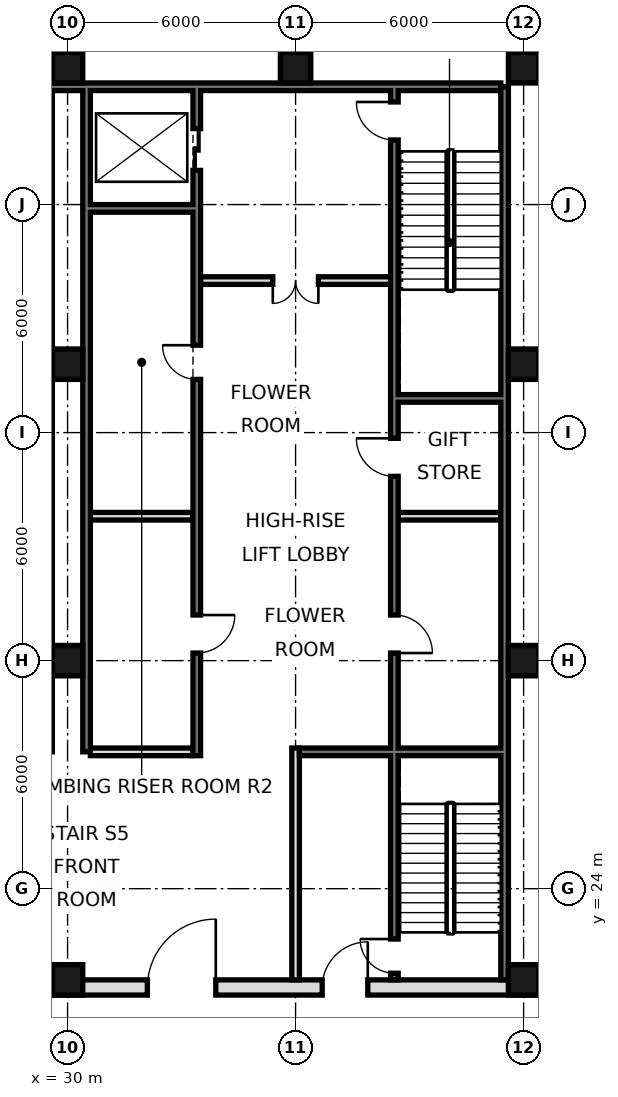
"""IFC4 building model, lengths in metres.
Left out: names, types, materials, properties, quantities, classifications, styles, units other than length and angle.
Written with IfcOpenShell. Run it as: python <this file> out.ifc"""

import sys

from ifc_helpers import new_model, si_unit, direction, frame, frame_2d, origin, origin_2d, place, context, subcontext, project, spatial, rectangle, hollow_rectangle, extrude, element, fill, save


model = new_model("IFC4")
c1 = context("Model", 3, precision=1e-05, world=origin(), true_north=direction((0.0, 1.0)))
c2 = subcontext(c1, "Body", "Model", "MODEL_VIEW")
j1 = project(units=[si_unit("LENGTHUNIT", "METRE"), si_unit("PLANEANGLEUNIT", "RADIAN")], contexts=[c1])
p1 = place(None, origin())
s1 = spatial("IfcSite", under=j1, at=p1, CompositionType="ELEMENT")
p2 = place(p1, origin())
s2 = spatial("IfcBuilding", under=s1, at=p2, CompositionType="ELEMENT")
p3 = place(p2, frame((0.0, 0.0, 39.6)))
s3 = spatial("IfcBuildingStorey", under=s2, at=p3, CompositionType="ELEMENT", Elevation=39.6)
for number, where, z_axis, x_axis in (
    (1, (30.0, 21.6, 0.0), (0.0, 0.0, 1.0), (1.0, 0.0, 0.0)),
    (2, (30.0, 30.0, 0.0), (0.0, 0.0, 1.0), (1.0, 0.0, 0.0)),
    (3, (30.0, 37.8, 0.0), (0.0, 0.0, 1.0), (1.0, 0.0, 0.0)),
    (4, (30.0, 45.6, 0.0), (0.0, 0.0, 1.0), (1.0, 0.0, 0.0)),
    (5, (36.0, 45.6, 0.0), (0.0, 0.0, 1.0), (1.0, 0.0, 0.0)),
    (6, (42.0, 21.6, 0.0), (0.0, 0.0, 1.0), (1.0, 0.0, 0.0)),
    (7, (42.0, 30.0, 0.0), (0.0, 0.0, 1.0), (1.0, 0.0, 0.0)),
    (8, (42.0, 37.8, 0.0), (0.0, 0.0, 1.0), (1.0, 0.0, 0.0)),
    (9, (42.0, 45.6, 0.0), (0.0, 0.0, 1.0), (1.0, 0.0, 0.0)),
):
    element("IfcColumn", number, at=place(p3, frame(where, z_axis=z_axis, x_axis=x_axis)), inside=s3, PredefinedType="COLUMN", context=c2, shape_type="SweptSolid", body=[
        extrude(hollow_rectangle(XDim=0.8, YDim=0.8, WallThickness=0.07, at=origin_2d()), origin(), (0.0, 0.0, 1.0), 4.8),
    ])
p4 = place(p3, frame((41.5, 21.6, 0.0), z_axis=(0.0, 0.0, 1.0), x_axis=(0.0, 1.0, 0.0)))
e10 = element("IfcWall", 10, at=p4, inside=s3, PredefinedType="SOLIDWALL", context=c2, shape_type="SweptSolid", body=[
    extrude(rectangle(XDim=23.5, YDim=0.2, at=frame_2d((11.75, 0.0))), origin(), (0.0, 0.0, 1.0), 4.5),
])
p5 = place(p3, frame((6.6, 45.1, 0.0), z_axis=(0.0, 0.0, 1.0), x_axis=(1.0, 0.0, 0.0)))
e11 = element("IfcWall", 11, at=p5, inside=s3, PredefinedType="SOLIDWALL", context=c2, shape_type="SweptSolid", body=[
    extrude(rectangle(XDim=34.8, YDim=0.2, at=frame_2d((17.4, 0.0))), origin(), (0.0, 0.0, 1.0), 4.5),
])
p6 = place(p3, frame((30.5, 27.6, 0.0), z_axis=(0.0, 0.0, 1.0), x_axis=(0.0, 1.0, 0.0)))
e12 = element("IfcWall", 12, at=p6, inside=s3, PredefinedType="SOLIDWALL", context=c2, shape_type="SweptSolid", body=[
    extrude(rectangle(XDim=17.5, YDim=0.2, at=frame_2d((8.75, 0.0))), origin(), (0.0, 0.0, 1.0), 4.5),
])
p7 = place(p3, frame((5.6, 21.4, 0.0), z_axis=(0.0, 0.0, 1.0), x_axis=(1.0, 0.0, 0.0)))
e13 = element("IfcWall", 13, at=p7, inside=s3, PredefinedType="SOLIDWALL", context=c2, shape_type="SweptSolid", body=[
    extrude(rectangle(XDim=36.8, YDim=0.4, at=frame_2d((18.4, 0.0))), origin(), (0.0, 0.0, 1.0), 4.5),
])
p8 = place(p7, frame((8.5, 0.0, 0.0)))
e14 = element("IfcOpeningElement", 14, at=p8, cuts=e13, PredefinedType="OPENING", context=c2, shape_type="SweptSolid", body=[
    extrude(rectangle(XDim=1.8, YDim=2.1, at=frame_2d((0.9, 1.05))), frame((0.0, 0.21, 0.0), z_axis=(0.0, -1.0, 0.0), x_axis=(1.0, 0.0, 0.0)), (0.0, 0.0, 1.0), 0.42),
])
p9 = place(p7, frame((17.5, 0.0, 0.0)))
e15 = element("IfcOpeningElement", 15, at=p9, cuts=e13, PredefinedType="OPENING", context=c2, shape_type="SweptSolid", body=[
    extrude(rectangle(XDim=1.8, YDim=2.1, at=frame_2d((0.9, 1.05))), frame((0.0, 0.21, 0.0), z_axis=(0.0, -1.0, 0.0), x_axis=(1.0, 0.0, 0.0)), (0.0, 0.0, 1.0), 0.42),
])
p10 = place(p7, frame((26.5, 0.0, 0.0)))
e16 = element("IfcOpeningElement", 16, at=p10, cuts=e13, PredefinedType="OPENING", context=c2, shape_type="SweptSolid", body=[
    extrude(rectangle(XDim=1.8, YDim=2.1, at=frame_2d((0.9, 1.05))), frame((0.0, 0.21, 0.0), z_axis=(0.0, -1.0, 0.0), x_axis=(1.0, 0.0, 0.0)), (0.0, 0.0, 1.0), 0.42),
])
p11 = place(p7, frame((4.5, 0.0, 0.0)))
e17 = element("IfcOpeningElement", 17, at=p11, cuts=e13, PredefinedType="OPENING", context=c2, shape_type="SweptSolid", body=[
    extrude(rectangle(XDim=1.2, YDim=2.1, at=frame_2d((0.6, 1.05))), frame((0.0, 0.21, 0.0), z_axis=(0.0, -1.0, 0.0), x_axis=(1.0, 0.0, 0.0)), (0.0, 0.0, 1.0), 0.42),
])
p12 = place(p7, frame((31.1, 0.0, 0.0)))
e18 = element("IfcOpeningElement", 18, at=p12, cuts=e13, PredefinedType="OPENING", context=c2, shape_type="SweptSolid", body=[
    extrude(rectangle(XDim=1.2, YDim=2.1, at=frame_2d((0.6, 1.05))), frame((0.0, 0.21, 0.0), z_axis=(0.0, -1.0, 0.0), x_axis=(1.0, 0.0, 0.0)), (0.0, 0.0, 1.0), 0.42),
])
p13 = place(p3, frame((33.4, 27.5, 0.0), z_axis=(0.0, 0.0, 1.0), x_axis=(0.0, 1.0, 0.0)))
e19 = element("IfcWall", 19, at=p13, inside=s3, PredefinedType="SOLIDWALL", context=c2, shape_type="SweptSolid", body=[
    extrude(rectangle(XDim=17.5, YDim=0.2, at=frame_2d((8.75, 0.0))), origin(), (0.0, 0.0, 1.0), 4.5),
])
p14 = place(p13, frame((15.4, 0.0, 0.0)))
e20 = element("IfcOpeningElement", 20, at=p14, cuts=e19, PredefinedType="OPENING", context=c2, shape_type="SweptSolid", body=[
    extrude(rectangle(XDim=1.1, YDim=2.1, at=frame_2d((0.55, 1.05))), frame((0.0, 0.11, 0.0), z_axis=(0.0, -1.0, 0.0), x_axis=(1.0, 0.0, 0.0)), (0.0, 0.0, 1.0), 0.22),
])
p15 = place(p13, frame((2.7, 0.0, 0.0)))
e21 = element("IfcOpeningElement", 21, at=p15, cuts=e19, PredefinedType="OPENING", context=c2, shape_type="SweptSolid", body=[
    extrude(rectangle(XDim=1.0, YDim=2.1, at=frame_2d((0.5, 1.05))), frame((0.0, 0.11, 0.0), z_axis=(0.0, -1.0, 0.0), x_axis=(1.0, 0.0, 0.0)), (0.0, 0.0, 1.0), 0.22),
])
p16 = place(p13, frame((9.9, 0.0, 0.0)))
e22 = element("IfcOpeningElement", 22, at=p16, cuts=e19, PredefinedType="OPENING", context=c2, shape_type="SweptSolid", body=[
    extrude(rectangle(XDim=0.9, YDim=2.1, at=frame_2d((0.45, 1.05))), frame((0.0, 0.11, 0.0), z_axis=(0.0, -1.0, 0.0), x_axis=(1.0, 0.0, 0.0)), (0.0, 0.0, 1.0), 0.22),
])
p17 = place(p3, frame((36.0, 21.6, 0.0), z_axis=(0.0, 0.0, 1.0), x_axis=(0.0, 1.0, 0.0)))
e23 = element("IfcWall", 23, at=p17, inside=s3, PredefinedType="PARTITIONING", context=c2, shape_type="SweptSolid", body=[
    extrude(rectangle(XDim=6.1, YDim=0.2, at=frame_2d((3.05, 0.0))), origin(), (0.0, 0.0, 1.0), 4.5),
])
p18 = place(p3, frame((38.6, 21.6, 0.0), z_axis=(0.0, 0.0, 1.0), x_axis=(0.0, 1.0, 0.0)))
e24 = element("IfcWall", 24, at=p18, inside=s3, PredefinedType="SOLIDWALL", context=c2, shape_type="SweptSolid", body=[
    extrude(rectangle(XDim=23.4, YDim=0.2, at=frame_2d((11.7, 0.0))), origin(), (0.0, 0.0, 1.0), 4.5),
])
p19 = place(p18, frame((8.6, 0.0, 0.0)))
e25 = element("IfcOpeningElement", 25, at=p19, cuts=e24, PredefinedType="OPENING", context=c2, shape_type="SweptSolid", body=[
    extrude(rectangle(XDim=1.0, YDim=2.1, at=frame_2d((0.5, 1.05))), frame((0.0, 0.11, 0.0), z_axis=(0.0, -1.0, 0.0), x_axis=(1.0, 0.0, 0.0)), (0.0, 0.0, 1.0), 0.22),
])
p20 = place(p18, frame((13.25, 0.0, 0.0)))
e26 = element("IfcOpeningElement", 26, at=p20, cuts=e24, PredefinedType="OPENING", context=c2, shape_type="SweptSolid", body=[
    extrude(rectangle(XDim=1.0, YDim=2.1, at=frame_2d((0.5, 1.05))), frame((0.0, 0.11, 0.0), z_axis=(0.0, -1.0, 0.0), x_axis=(1.0, 0.0, 0.0)), (0.0, 0.0, 1.0), 0.22),
])
p21 = place(p18, frame((22.1, 0.0, 0.0)))
e27 = element("IfcOpeningElement", 27, at=p21, cuts=e24, PredefinedType="OPENING", context=c2, shape_type="SweptSolid", body=[
    extrude(rectangle(XDim=1.0, YDim=2.1, at=frame_2d((0.5, 1.05))), frame((0.0, 0.11, 0.0), z_axis=(0.0, -1.0, 0.0), x_axis=(1.0, 0.0, 0.0)), (0.0, 0.0, 1.0), 0.22),
])
p22 = place(p18, frame((0.175, 0.0, 0.0)))
e28 = element("IfcOpeningElement", 28, at=p22, cuts=e24, PredefinedType="OPENING", context=c2, shape_type="SweptSolid", body=[
    extrude(rectangle(XDim=0.9, YDim=2.1, at=frame_2d((0.45, 1.05))), frame((0.0, 0.11, 0.0), z_axis=(0.0, -1.0, 0.0), x_axis=(1.0, 0.0, 0.0)), (0.0, 0.0, 1.0), 0.22),
])
p23 = place(p3, frame((30.6, 27.6, 0.0), z_axis=(0.0, 0.0, 1.0), x_axis=(1.0, 0.0, 0.0)))
e29 = element("IfcWall", 29, at=p23, inside=s3, PredefinedType="PARTITIONING", context=c2, shape_type="SweptSolid", body=[
    extrude(rectangle(XDim=2.7, YDim=0.2, at=frame_2d((1.35, 0.0))), origin(), (0.0, 0.0, 1.0), 4.5),
])
p24 = place(p3, frame((36.1, 27.6, 0.0), z_axis=(0.0, 0.0, 1.0), x_axis=(1.0, 0.0, 0.0)))
e30 = element("IfcWall", 30, at=p24, inside=s3, PredefinedType="SOLIDWALL", context=c2, shape_type="SweptSolid", body=[
    extrude(rectangle(XDim=5.3, YDim=0.2, at=frame_2d((2.65, 0.0))), origin(), (0.0, 0.0, 1.0), 4.5),
])
p25 = place(p3, frame((30.6, 33.8, 0.0), z_axis=(0.0, 0.0, 1.0), x_axis=(1.0, 0.0, 0.0)))
e31 = element("IfcWall", 31, at=p25, inside=s3, PredefinedType="SOLIDWALL", context=c2, shape_type="SweptSolid", body=[
    extrude(rectangle(XDim=2.7, YDim=0.2, at=frame_2d((1.35, 0.0))), origin(), (0.0, 0.0, 1.0), 4.5),
])
p26 = place(p3, frame((38.7, 33.8, 0.0), z_axis=(0.0, 0.0, 1.0), x_axis=(1.0, 0.0, 0.0)))
e32 = element("IfcWall", 32, at=p26, inside=s3, PredefinedType="PARTITIONING", context=c2, shape_type="SweptSolid", body=[
    extrude(rectangle(XDim=2.7, YDim=0.2, at=frame_2d((1.35, 0.0))), origin(), (0.0, 0.0, 1.0), 4.5),
])
p27 = place(p3, frame((38.7, 36.9, 0.0), z_axis=(0.0, 0.0, 1.0), x_axis=(1.0, 0.0, 0.0)))
e33 = element("IfcWall", 33, at=p27, inside=s3, PredefinedType="SOLIDWALL", context=c2, shape_type="SweptSolid", body=[
    extrude(rectangle(XDim=2.7, YDim=0.2, at=frame_2d((1.35, 0.0))), origin(), (0.0, 0.0, 1.0), 4.5),
])
p28 = place(p3, frame((33.5, 40.0, 0.0), z_axis=(0.0, 0.0, 1.0), x_axis=(1.0, 0.0, 0.0)))
e34 = element("IfcWall", 34, at=p28, inside=s3, PredefinedType="PARTITIONING", context=c2, shape_type="SweptSolid", body=[
    extrude(rectangle(XDim=5.0, YDim=0.2, at=frame_2d((2.5, 0.0))), origin(), (0.0, 0.0, 1.0), 4.5),
])
p29 = place(p28, frame((1.9, 0.0, 0.0)))
e35 = element("IfcOpeningElement", 35, at=p29, cuts=e34, PredefinedType="OPENING", context=c2, shape_type="SweptSolid", body=[
    extrude(rectangle(XDim=1.2, YDim=2.1, at=frame_2d((0.6, 1.05))), frame((0.0, 0.11, 0.0), z_axis=(0.0, -1.0, 0.0), x_axis=(1.0, 0.0, 0.0)), (0.0, 0.0, 1.0), 0.22),
])
p30 = place(p3, frame((30.6, 41.9, 0.0), z_axis=(0.0, 0.0, 1.0), x_axis=(1.0, 0.0, 0.0)))
e36 = element("IfcWall", 36, at=p30, inside=s3, PredefinedType="SOLIDWALL", context=c2, shape_type="SweptSolid", body=[
    extrude(rectangle(XDim=2.7, YDim=0.2, at=frame_2d((1.35, 0.0))), origin(), (0.0, 0.0, 1.0), 4.5),
])
p31 = place(p10, frame((1.8, 0.0, 0.0), z_axis=(0.0, 0.0, 1.0), x_axis=(-1.0, 0.0, 0.0)))
e37 = element("IfcDoor", 37, at=p31, inside=s3, OperationType="SINGLE_SWING_LEFT", PredefinedType="DOOR", context=c2, shape_type="SweptSolid", body=[
    extrude(rectangle(XDim=1.8, YDim=2.1, at=frame_2d((0.9, 1.05))), frame((0.0, 0.025, 0.0), z_axis=(0.0, -1.0, 0.0), x_axis=(1.0, 0.0, 0.0)), (0.0, 0.0, 1.0), 0.05),
])
fill(e16, e37)
p32 = place(p12, frame((1.2, 0.0, 0.0), z_axis=(0.0, 0.0, 1.0), x_axis=(-1.0, 0.0, 0.0)))
e38 = element("IfcDoor", 38, at=p32, inside=s3, OperationType="SINGLE_SWING_LEFT", PredefinedType="DOOR", context=c2, shape_type="SweptSolid", body=[
    extrude(rectangle(XDim=1.2, YDim=2.1, at=frame_2d((0.6, 1.05))), frame((0.0, 0.025, 0.0), z_axis=(0.0, -1.0, 0.0), x_axis=(1.0, 0.0, 0.0)), (0.0, 0.0, 1.0), 0.05),
])
fill(e18, e38)
p33 = place(p29, frame((1.2, 0.0, 0.0), z_axis=(0.0, 0.0, 1.0), x_axis=(-1.0, 0.0, 0.0)))
e39 = element("IfcDoor", 39, at=p33, inside=s3, OperationType="DOUBLE_DOOR_SINGLE_SWING", PredefinedType="DOOR", context=c2, shape_type="SweptSolid", body=[
    extrude(rectangle(XDim=1.2, YDim=2.1, at=frame_2d((0.6, 1.05))), frame((0.0, 0.025, 0.0), z_axis=(0.0, -1.0, 0.0), x_axis=(1.0, 0.0, 0.0)), (0.0, 0.0, 1.0), 0.05),
])
fill(e35, e39)
p34 = place(p14, origin())
e40 = element("IfcDoor", 40, at=p34, inside=s3, OperationType="DOUBLE_DOOR_SLIDING", PredefinedType="DOOR", context=c2, shape_type="SweptSolid", body=[
    extrude(rectangle(XDim=1.1, YDim=2.1, at=frame_2d((0.55, 1.05))), frame((0.0, 0.025, 0.0), z_axis=(0.0, -1.0, 0.0), x_axis=(1.0, 0.0, 0.0)), (0.0, 0.0, 1.0), 0.05),
])
fill(e20, e40)
p35 = place(p19, frame((1.0, 0.0, 0.0), z_axis=(0.0, 0.0, 1.0), x_axis=(-1.0, 0.0, 0.0)))
e41 = element("IfcDoor", 41, at=p35, inside=s3, OperationType="SINGLE_SWING_RIGHT", PredefinedType="DOOR", context=c2, shape_type="SweptSolid", body=[
    extrude(rectangle(XDim=1.0, YDim=2.1, at=frame_2d((0.5, 1.05))), frame((0.0, 0.025, 0.0), z_axis=(0.0, -1.0, 0.0), x_axis=(1.0, 0.0, 0.0)), (0.0, 0.0, 1.0), 0.05),
])
fill(e25, e41)
p36 = place(p20, frame((1.0, 0.0, 0.0), z_axis=(0.0, 0.0, 1.0), x_axis=(-1.0, 0.0, 0.0)))
e42 = element("IfcDoor", 42, at=p36, inside=s3, OperationType="SINGLE_SWING_LEFT", PredefinedType="DOOR", context=c2, shape_type="SweptSolid", body=[
    extrude(rectangle(XDim=1.0, YDim=2.1, at=frame_2d((0.5, 1.05))), frame((0.0, 0.025, 0.0), z_axis=(0.0, -1.0, 0.0), x_axis=(1.0, 0.0, 0.0)), (0.0, 0.0, 1.0), 0.05),
])
fill(e26, e42)
p37 = place(p15, origin())
e43 = element("IfcDoor", 43, at=p37, inside=s3, OperationType="SINGLE_SWING_RIGHT", PredefinedType="DOOR", context=c2, shape_type="SweptSolid", body=[
    extrude(rectangle(XDim=1.0, YDim=2.1, at=frame_2d((0.5, 1.05))), frame((0.0, 0.025, 0.0), z_axis=(0.0, -1.0, 0.0), x_axis=(1.0, 0.0, 0.0)), (0.0, 0.0, 1.0), 0.05),
])
fill(e21, e43)
p38 = place(p21, frame((1.0, 0.0, 0.0), z_axis=(0.0, 0.0, 1.0), x_axis=(-1.0, 0.0, 0.0)))
e44 = element("IfcDoor", 44, at=p38, inside=s3, OperationType="SINGLE_SWING_LEFT", PredefinedType="DOOR", context=c2, shape_type="SweptSolid", body=[
    extrude(rectangle(XDim=1.0, YDim=2.1, at=frame_2d((0.5, 1.05))), frame((0.0, 0.025, 0.0), z_axis=(0.0, -1.0, 0.0), x_axis=(1.0, 0.0, 0.0)), (0.0, 0.0, 1.0), 0.05),
])
fill(e27, e44)
p39 = place(p22, frame((0.9, 0.0, 0.0), z_axis=(0.0, 0.0, 1.0), x_axis=(-1.0, 0.0, 0.0)))
e45 = element("IfcDoor", 45, at=p39, inside=s3, OperationType="SINGLE_SWING_LEFT", PredefinedType="DOOR", context=c2, shape_type="SweptSolid", body=[
    extrude(rectangle(XDim=0.9, YDim=2.1, at=frame_2d((0.45, 1.05))), frame((0.0, 0.025, 0.0), z_axis=(0.0, -1.0, 0.0), x_axis=(1.0, 0.0, 0.0)), (0.0, 0.0, 1.0), 0.05),
])
fill(e28, e45)
p40 = place(p16, frame((0.9, 0.0, 0.0), z_axis=(0.0, 0.0, 1.0), x_axis=(-1.0, 0.0, 0.0)))
e46 = element("IfcDoor", 46, at=p40, inside=s3, OperationType="SINGLE_SWING_LEFT", PredefinedType="DOOR", context=c2, shape_type="SweptSolid", body=[
    extrude(rectangle(XDim=0.9, YDim=2.1, at=frame_2d((0.45, 1.05))), frame((0.0, 0.025, 0.0), z_axis=(0.0, -1.0, 0.0), x_axis=(1.0, 0.0, 0.0)), (0.0, 0.0, 1.0), 0.05),
])
fill(e22, e46)
save(model, sys.argv[1])
